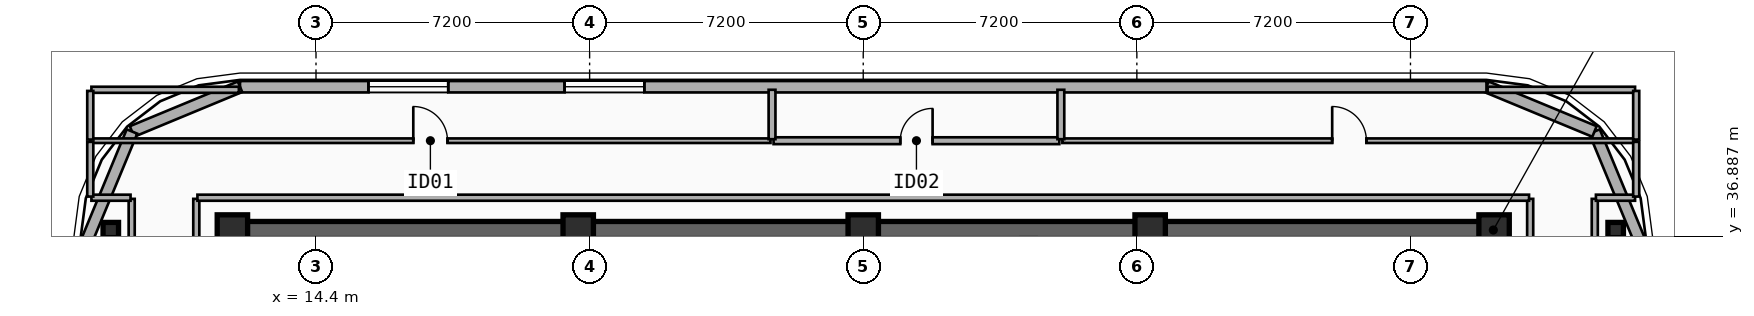
"""IFC4 building model, lengths in metres.
Left out: names, types, materials, properties, quantities, classifications, styles, units other than length and angle.
Written with IfcOpenShell. Run it as: python <this file> out.ifc"""

import sys

from ifc_helpers import new_model, si_unit, direction, frame, frame_2d, origin, origin_2d, place, context, subcontext, project, spatial, rectangle, i_section, extrude, element, fill, save


model = new_model("IFC4")
c1 = context("Model", 3, precision=1e-05, world=origin(), true_north=direction((0.0, 1.0)))
c2 = subcontext(c1, "Body", "Model", "MODEL_VIEW")
j1 = project(units=[si_unit("LENGTHUNIT", "METRE"), si_unit("PLANEANGLEUNIT", "RADIAN")], contexts=[c1])
p1 = place(None, origin())
s1 = spatial("IfcSite", under=j1, at=p1, CompositionType="ELEMENT")
p2 = place(p1, origin())
s2 = spatial("IfcBuilding", under=s1, at=p2, CompositionType="ELEMENT")
p3 = place(p2, frame((0.0, 0.0, 247.3)))
s3 = spatial("IfcBuildingStorey", under=s2, at=p3, CompositionType="ELEMENT", Elevation=247.3)
p4 = place(p3, frame((12.15, 37.05, 0.0), z_axis=(0.0, 0.0, 1.0), x_axis=(1.0, 0.0, 0.0)))
e1 = element("IfcWall", 1, at=p4, inside=s3, PredefinedType="SHEAR", context=c2, shape_type="SweptSolid", body=[
    extrude(rectangle(XDim=33.23, YDim=0.45, at=frame_2d((16.615, 0.0))), origin(), (0.0, 0.0, 1.0), 3.7),
])
for number, where, z_axis, x_axis in (
    (2, (12.2, 37.05, 0.0), (0.0, 0.0, 1.0), (1.0, 0.0, 0.0)),
    (3, (21.3, 37.05, 0.0), (0.0, 0.0, 1.0), (1.0, 0.0, 0.0)),
    (4, (28.8, 37.05, 0.0), (0.0, 0.0, 1.0), (1.0, 0.0, 0.0)),
    (5, (36.35, 37.05, 0.0), (0.0, 0.0, 1.0), (1.0, 0.0, 0.0)),
    (6, (45.4, 37.05, 0.0), (0.0, 0.0, 1.0), (1.0, 0.0, 0.0)),
):
    element("IfcColumn", number, at=place(p3, frame(where, z_axis=z_axis, x_axis=x_axis)), inside=s3, PredefinedType="COLUMN", context=c2, shape_type="SweptSolid", body=[
        extrude(rectangle(XDim=0.8, YDim=0.8, at=origin_2d()), origin(), (0.0, 0.0, 1.0), 3.7),
    ])
for number, where, z_axis, x_axis in (
    (7, (9.0, 37.05, 0.0), (0.0, 0.0, 1.0), (1.0, 0.0, 0.0)),
    (8, (48.6, 37.05, 0.0), (0.0, 0.0, 1.0), (1.0, 0.0, 0.0)),
):
    element("IfcColumn", number, at=place(p3, frame(where, z_axis=z_axis, x_axis=x_axis)), inside=s3, PredefinedType="COLUMN", context=c2, shape_type="SweptSolid", body=[
        extrude(i_section(OverallWidth=0.408, OverallDepth=0.4, WebThickness=0.025, FlangeThickness=0.039, FilletRadius=0.015, at=origin_2d()), origin(), (0.0, 0.0, 1.0), 3.7),
    ])
for number, where, z_axis, x_axis in (
    (9, (48.042, 39.643, 0.0), (0.0, 0.0, 1.0), (0.383, -0.924, 0.0)),
    (10, (45.2, 40.82, 0.0), (0.0, 0.0, 1.0), (0.924, -0.383, 0.0)),
):
    element("IfcWall", number, at=place(p3, frame(where, z_axis=z_axis, x_axis=x_axis)), inside=s3, PredefinedType="SOLIDWALL", context=c2, shape_type="SweptSolid", body=[
        extrude(rectangle(XDim=3.077, YDim=0.3, at=frame_2d((1.538, 0.0))), origin(), (0.0, 0.0, 1.0), 3.42),
    ])
p5 = place(p3, frame((12.4, 40.82, 0.0), z_axis=(0.0, 0.0, 1.0), x_axis=(1.0, 0.0, 0.0)))
e11 = element("IfcWall", 11, at=p5, inside=s3, PredefinedType="SOLIDWALL", context=c2, shape_type="SweptSolid", body=[
    extrude(rectangle(XDim=32.8, YDim=0.3, at=frame_2d((16.4, 0.0))), origin(), (0.0, 0.0, 1.0), 3.42),
])
p6 = place(p5, frame((3.38, 0.0, 0.75)))
e12 = element("IfcOpeningElement", 12, at=p6, cuts=e11, PredefinedType="OPENING", context=c2, shape_type="SweptSolid", body=[
    extrude(rectangle(XDim=2.1, YDim=2.1, at=frame_2d((1.05, 1.05))), frame((0.0, 0.16, 0.0), z_axis=(0.0, -1.0, 0.0), x_axis=(1.0, 0.0, 0.0)), (0.0, 0.0, 1.0), 0.32),
])
p7 = place(p5, frame((8.54, 0.0, 0.75)))
e13 = element("IfcOpeningElement", 13, at=p7, cuts=e11, PredefinedType="OPENING", context=c2, shape_type="SweptSolid", body=[
    extrude(rectangle(XDim=2.1, YDim=2.1, at=frame_2d((1.05, 1.05))), frame((0.0, 0.16, 0.0), z_axis=(0.0, -1.0, 0.0), x_axis=(1.0, 0.0, 0.0)), (0.0, 0.0, 1.0), 0.32),
])
for number, where, z_axis, x_axis in (
    (14, (9.557, 39.643, 0.0), (0.0, 0.0, 1.0), (0.924, 0.383, 0.0)),
    (15, (8.38, 36.8, 0.0), (0.0, 0.0, 1.0), (0.383, 0.924, 0.0)),
):
    element("IfcWall", number, at=place(p3, frame(where, z_axis=z_axis, x_axis=x_axis)), inside=s3, PredefinedType="SOLIDWALL", context=c2, shape_type="SweptSolid", body=[
        extrude(rectangle(XDim=3.077, YDim=0.3, at=frame_2d((1.538, 0.0))), origin(), (0.0, 0.0, 1.0), 3.42),
    ])
p8 = place(p3, frame((8.46, 39.4, 0.0), z_axis=(0.0, 0.0, 1.0), x_axis=(1.0, 0.0, 0.0)))
e16 = element("IfcWall", 16, at=p8, inside=s3, PredefinedType="PARTITIONING", context=c2, shape_type="SweptSolid", body=[
    extrude(rectangle(XDim=17.9, YDim=0.12, at=frame_2d((8.95, 0.0))), origin(), (0.0, 0.0, 1.0), 3.42),
])
p9 = place(p8, frame((8.5, 0.0, 0.0)))
e17 = element("IfcOpeningElement", 17, at=p9, cuts=e16, PredefinedType="OPENING", context=c2, shape_type="SweptSolid", body=[
    extrude(rectangle(XDim=0.9, YDim=2.1, at=frame_2d((0.45, 1.05))), frame((0.0, 0.07, 0.0), z_axis=(0.0, -1.0, 0.0), x_axis=(1.0, 0.0, 0.0)), (0.0, 0.0, 1.0), 0.14),
])
p10 = place(p3, frame((26.44, 39.4, 0.0), z_axis=(0.0, 0.0, 1.0), x_axis=(1.0, 0.0, 0.0)))
e18 = element("IfcWall", 18, at=p10, inside=s3, PredefinedType="PLUMBINGWALL", context=c2, shape_type="SweptSolid", body=[
    extrude(rectangle(XDim=7.52, YDim=0.18, at=frame_2d((3.76, 0.0))), origin(), (0.0, 0.0, 1.0), 3.42),
])
p11 = place(p10, frame((3.335, 0.0, 0.0)))
e19 = element("IfcOpeningElement", 19, at=p11, cuts=e18, PredefinedType="OPENING", context=c2, shape_type="SweptSolid", body=[
    extrude(rectangle(XDim=0.85, YDim=2.1, at=frame_2d((0.425, 1.05))), frame((0.0, 0.1, 0.0), z_axis=(0.0, -1.0, 0.0), x_axis=(1.0, 0.0, 0.0)), (0.0, 0.0, 1.0), 0.2),
])
p12 = place(p3, frame((34.04, 39.4, 0.0), z_axis=(0.0, 0.0, 1.0), x_axis=(1.0, 0.0, 0.0)))
e20 = element("IfcWall", 20, at=p12, inside=s3, PredefinedType="PARTITIONING", context=c2, shape_type="SweptSolid", body=[
    extrude(rectangle(XDim=15.1, YDim=0.12, at=frame_2d((7.55, 0.0))), origin(), (0.0, 0.0, 1.0), 3.42),
])
p13 = place(p12, frame((7.1, 0.0, 0.0)))
e21 = element("IfcOpeningElement", 21, at=p13, cuts=e20, PredefinedType="OPENING", context=c2, shape_type="SweptSolid", body=[
    extrude(rectangle(XDim=0.9, YDim=2.1, at=frame_2d((0.45, 1.05))), frame((0.0, 0.07, 0.0), z_axis=(0.0, -1.0, 0.0), x_axis=(1.0, 0.0, 0.0)), (0.0, 0.0, 1.0), 0.14),
])
for number, where, z_axis, x_axis in (
    (22, (26.4, 39.44, 0.0), (0.0, 0.0, 1.0), (0.0, 1.0, 0.0)),
    (23, (34.0, 39.44, 0.0), (0.0, 0.0, 1.0), (0.0, 1.0, 0.0)),
):
    element("IfcWall", number, at=place(p3, frame(where, z_axis=z_axis, x_axis=x_axis)), inside=s3, PredefinedType="PLUMBINGWALL", context=c2, shape_type="SweptSolid", body=[
        extrude(rectangle(XDim=1.3, YDim=0.18, at=frame_2d((0.65, 0.0))), origin(), (0.0, 0.0, 1.0), 3.42),
    ])
for number, where, z_axis, x_axis in (
    (24, (9.55, 27.63, 0.0), (0.0, 0.0, 1.0), (0.0, 1.0, 0.0)),
    (25, (11.25, 27.63, 0.0), (0.0, 0.0, 1.0), (0.0, 1.0, 0.0)),
    (26, (46.35, 27.63, 0.0), (0.0, 0.0, 1.0), (0.0, 1.0, 0.0)),
    (27, (48.05, 27.63, 0.0), (0.0, 0.0, 1.0), (0.0, 1.0, 0.0)),
):
    element("IfcWall", number, at=place(p3, frame(where, z_axis=z_axis, x_axis=x_axis)), inside=s3, PredefinedType="PARTITIONING", context=c2, shape_type="SweptSolid", body=[
        extrude(rectangle(XDim=10.24, YDim=0.16, at=frame_2d((5.12, 0.0))), origin(), (0.0, 0.0, 1.0), 2.9),
    ])
p14 = place(p3, frame((8.49, 37.9, 0.0), z_axis=(0.0, 0.0, 1.0), x_axis=(1.0, 0.0, 0.0)))
e28 = element("IfcWall", 28, at=p14, inside=s3, PredefinedType="PARTITIONING", context=c2, shape_type="SweptSolid", body=[
    extrude(rectangle(XDim=1.03, YDim=0.16, at=frame_2d((0.515, 0.0))), origin(), (0.0, 0.0, 1.0), 3.42),
])
p15 = place(p3, frame((11.28, 37.9, 0.0), z_axis=(0.0, 0.0, 1.0), x_axis=(1.0, 0.0, 0.0)))
e29 = element("IfcWall", 29, at=p15, inside=s3, PredefinedType="PARTITIONING", context=c2, shape_type="SweptSolid", body=[
    extrude(rectangle(XDim=35.04, YDim=0.16, at=frame_2d((17.52, 0.0))), origin(), (0.0, 0.0, 1.0), 3.42),
])
p16 = place(p3, frame((48.08, 37.9, 0.0), z_axis=(0.0, 0.0, 1.0), x_axis=(1.0, 0.0, 0.0)))
e30 = element("IfcWall", 30, at=p16, inside=s3, PredefinedType="PARTITIONING", context=c2, shape_type="SweptSolid", body=[
    extrude(rectangle(XDim=1.03, YDim=0.16, at=frame_2d((0.515, 0.0))), origin(), (0.0, 0.0, 1.0), 3.42),
])
for number, where, z_axis, x_axis in (
    (31, (8.46, 37.93, 0.0), (0.0, 0.0, 1.0), (0.0, 1.0, 0.0)),
    (32, (49.14, 37.93, 0.0), (0.0, 0.0, 1.0), (0.0, 1.0, 0.0)),
):
    element("IfcWall", number, at=place(p3, frame(where, z_axis=z_axis, x_axis=x_axis)), inside=s3, PredefinedType="PARTITIONING", context=c2, shape_type="SweptSolid", body=[
        extrude(rectangle(XDim=1.44, YDim=0.16, at=frame_2d((0.72, 0.0))), origin(), (0.0, 0.0, 1.0), 3.42),
    ])
p17 = place(p3, frame((8.49, 40.74, 0.0), z_axis=(0.0, 0.0, 1.0), x_axis=(1.0, 0.0, 0.0)))
e33 = element("IfcWall", 33, at=p17, inside=s3, PredefinedType="PARTITIONING", context=c2, shape_type="SweptSolid", body=[
    extrude(rectangle(XDim=3.88, YDim=0.16, at=frame_2d((1.94, 0.0))), origin(), (0.0, 0.0, 1.0), 3.42),
])
p18 = place(p3, frame((8.46, 39.43, 0.0), z_axis=(0.0, 0.0, 1.0), x_axis=(0.0, 1.0, 0.0)))
e34 = element("IfcWall", 34, at=p18, inside=s3, PredefinedType="PARTITIONING", context=c2, shape_type="SweptSolid", body=[
    extrude(rectangle(XDim=1.28, YDim=0.16, at=frame_2d((0.64, 0.0))), origin(), (0.0, 0.0, 1.0), 3.42),
])
p19 = place(p3, frame((45.23, 40.74, 0.0), z_axis=(0.0, 0.0, 1.0), x_axis=(1.0, 0.0, 0.0)))
e35 = element("IfcWall", 35, at=p19, inside=s3, PredefinedType="PARTITIONING", context=c2, shape_type="SweptSolid", body=[
    extrude(rectangle(XDim=3.88, YDim=0.16, at=frame_2d((1.94, 0.0))), origin(), (0.0, 0.0, 1.0), 3.42),
])
p20 = place(p3, frame((49.14, 39.43, 0.0), z_axis=(0.0, 0.0, 1.0), x_axis=(0.0, 1.0, 0.0)))
e36 = element("IfcWall", 36, at=p20, inside=s3, PredefinedType="PARTITIONING", context=c2, shape_type="SweptSolid", body=[
    extrude(rectangle(XDim=1.28, YDim=0.16, at=frame_2d((0.64, 0.0))), origin(), (0.0, 0.0, 1.0), 3.42),
])
p21 = place(p6, origin())
e37 = element("IfcWindow", 37, at=p21, inside=s3, PartitioningType="SINGLE_PANEL", PredefinedType="WINDOW", context=c2, shape_type="SweptSolid", body=[
    extrude(rectangle(XDim=2.1, YDim=2.1, at=frame_2d((1.05, 1.05))), frame((0.0, 0.03, 0.0), z_axis=(0.0, -1.0, 0.0), x_axis=(1.0, 0.0, 0.0)), (0.0, 0.0, 1.0), 0.06),
])
fill(e12, e37)
p22 = place(p7, origin())
e38 = element("IfcWindow", 38, at=p22, inside=s3, PartitioningType="SINGLE_PANEL", PredefinedType="WINDOW", context=c2, shape_type="SweptSolid", body=[
    extrude(rectangle(XDim=2.1, YDim=2.1, at=frame_2d((1.05, 1.05))), frame((0.0, 0.03, 0.0), z_axis=(0.0, -1.0, 0.0), x_axis=(1.0, 0.0, 0.0)), (0.0, 0.0, 1.0), 0.06),
])
fill(e13, e38)
p23 = place(p9, origin())
e39 = element("IfcDoor", 39, at=p23, inside=s3, OperationType="SINGLE_SWING_LEFT", PredefinedType="DOOR", context=c2, shape_type="SweptSolid", body=[
    extrude(rectangle(XDim=0.9, YDim=2.1, at=frame_2d((0.45, 1.05))), frame((0.0, 0.025, 0.0), z_axis=(0.0, -1.0, 0.0), x_axis=(1.0, 0.0, 0.0)), (0.0, 0.0, 1.0), 0.05),
])
fill(e17, e39)
p24 = place(p11, origin())
e40 = element("IfcDoor", 40, at=p24, inside=s3, OperationType="SINGLE_SWING_RIGHT", PredefinedType="DOOR", context=c2, shape_type="SweptSolid", body=[
    extrude(rectangle(XDim=0.85, YDim=2.1, at=frame_2d((0.425, 1.05))), frame((0.0, 0.025, 0.0), z_axis=(0.0, -1.0, 0.0), x_axis=(1.0, 0.0, 0.0)), (0.0, 0.0, 1.0), 0.05),
])
fill(e19, e40)
p25 = place(p13, origin())
e41 = element("IfcDoor", 41, at=p25, inside=s3, OperationType="SINGLE_SWING_LEFT", PredefinedType="DOOR", context=c2, shape_type="SweptSolid", body=[
    extrude(rectangle(XDim=0.9, YDim=2.1, at=frame_2d((0.45, 1.05))), frame((0.0, 0.025, 0.0), z_axis=(0.0, -1.0, 0.0), x_axis=(1.0, 0.0, 0.0)), (0.0, 0.0, 1.0), 0.05),
])
fill(e21, e41)
save(model, sys.argv[1])
